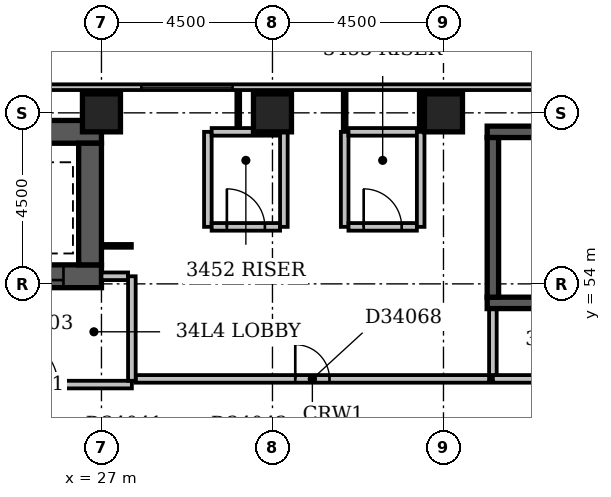
"""IFC4 building model, lengths in metres.
Left out: names, types, materials, properties, quantities, classifications, styles, units other than length and angle.
Written with IfcOpenShell. Run it as: python <this file> out.ifc"""

import sys

from ifc_helpers import new_model, si_unit, direction, frame, frame_2d, origin, origin_2d, place, context, subcontext, project, spatial, rectangle, extrude, element, fill, save


model = new_model("IFC4")
c1 = context("Model", 3, precision=1e-05, world=origin(), true_north=direction((0.0, 1.0)))
c2 = subcontext(c1, "Body", "Model", "MODEL_VIEW")
j1 = project(units=[si_unit("LENGTHUNIT", "METRE"), si_unit("PLANEANGLEUNIT", "RADIAN")], contexts=[c1])
p1 = place(None, origin())
s1 = spatial("IfcSite", under=j1, at=p1, CompositionType="ELEMENT")
p2 = place(p1, origin())
s2 = spatial("IfcBuilding", under=s1, at=p2, CompositionType="ELEMENT")
p3 = place(p2, frame((0.0, 0.0, 137.6)))
s3 = spatial("IfcBuildingStorey", under=s2, at=p3, CompositionType="ELEMENT", Elevation=137.6)
p4 = place(p3, frame((23.9, 54.2, -0.3), z_axis=(0.0, 0.0, 1.0), x_axis=(1.0, 0.0, 0.0)))
e1 = element("IfcWall", 1, at=p4, inside=s3, PredefinedType="SHEAR", context=c2, shape_type="SweptSolid", body=[
    extrude(rectangle(XDim=3.1, YDim=0.6, at=frame_2d((1.55, 0.0))), origin(), (0.0, 0.0, 1.0), 3.6),
])
p5 = place(p4, frame((1.0, 0.0, 0.3)))
e2 = element("IfcOpeningElement", 2, at=p5, cuts=e1, PredefinedType="OPENING", context=c2, shape_type="SweptSolid", body=[
    extrude(rectangle(XDim=1.1, YDim=2.1, at=frame_2d((0.55, 1.05))), frame((0.0, 0.312, 0.0), z_axis=(0.0, -1.0, 0.0), x_axis=(1.0, 0.0, 0.0)), (0.0, 0.0, 1.0), 0.624),
])
p6 = place(p3, frame((23.9, 58.0, -0.3), z_axis=(0.0, 0.0, 1.0), x_axis=(1.0, 0.0, 0.0)))
e3 = element("IfcWall", 3, at=p6, inside=s3, PredefinedType="SHEAR", context=c2, shape_type="SweptSolid", body=[
    extrude(rectangle(XDim=3.1, YDim=0.6, at=frame_2d((1.55, 0.0))), origin(), (0.0, 0.0, 1.0), 3.6),
])
p7 = place(p3, frame((26.7, 54.5, -0.3), z_axis=(0.0, 0.0, 1.0), x_axis=(0.0, 1.0, 0.0)))
e4 = element("IfcWall", 4, at=p7, inside=s3, PredefinedType="SHEAR", context=c2, shape_type="SweptSolid", body=[
    extrude(rectangle(XDim=3.2, YDim=0.6, at=frame_2d((1.6, 0.0))), origin(), (0.0, 0.0, 1.0), 3.6),
])
p8 = place(p3, frame((37.15, 53.5, -0.3), z_axis=(0.0, 0.0, 1.0), x_axis=(1.0, 0.0, 0.0)))
e5 = element("IfcWall", 5, at=p8, inside=s3, PredefinedType="SHEAR", context=c2, shape_type="SweptSolid", body=[
    extrude(rectangle(XDim=7.0, YDim=0.3, at=frame_2d((3.5, 0.0))), origin(), (0.0, 0.0, 1.0), 3.6),
])
p9 = place(p8, frame((5.58, 0.0, 0.3)))
e6 = element("IfcOpeningElement", 6, at=p9, cuts=e5, PredefinedType="OPENING", context=c2, shape_type="SweptSolid", body=[
    extrude(rectangle(XDim=1.1, YDim=2.1, at=frame_2d((0.55, 1.05))), frame((0.0, 0.162, 0.0), z_axis=(0.0, -1.0, 0.0), x_axis=(1.0, 0.0, 0.0)), (0.0, 0.0, 1.0), 0.324),
])
p10 = place(p3, frame((37.15, 58.0, -0.3), z_axis=(0.0, 0.0, 1.0), x_axis=(1.0, 0.0, 0.0)))
e7 = element("IfcWall", 7, at=p10, inside=s3, PredefinedType="SHEAR", context=c2, shape_type="SweptSolid", body=[
    extrude(rectangle(XDim=7.35, YDim=0.3, at=frame_2d((3.675, 0.0))), origin(), (0.0, 0.0, 1.0), 3.6),
])
p11 = place(p3, frame((37.3, 53.65, -0.3), z_axis=(0.0, 0.0, 1.0), x_axis=(0.0, 1.0, 0.0)))
e8 = element("IfcWall", 8, at=p11, inside=s3, PredefinedType="SHEAR", context=c2, shape_type="SweptSolid", body=[
    extrude(rectangle(XDim=4.2, YDim=0.3, at=frame_2d((2.1, 0.0))), origin(), (0.0, 0.0, 1.0), 3.6),
])
for number, where, z_axis, x_axis in (
    (9, (27.0, 58.5, -0.3), (0.0, 0.0, 1.0), (1.0, 0.0, 0.0)),
    (10, (31.5, 58.5, -0.3), (0.0, 0.0, 1.0), (1.0, 0.0, 0.0)),
    (11, (36.0, 58.5, -0.3), (0.0, 0.0, 1.0), (1.0, 0.0, 0.0)),
):
    element("IfcColumn", number, at=place(p3, frame(where, z_axis=z_axis, x_axis=x_axis)), inside=s3, PredefinedType="COLUMN", context=c2, shape_type="SweptSolid", body=[
        extrude(rectangle(XDim=1.0, YDim=1.0, at=origin_2d()), origin(), (0.0, 0.0, 1.0), 3.6),
    ])
p12 = place(p3, frame((68.1, 59.175, 0.0), z_axis=(0.0, 0.0, 1.0), x_axis=(-1.0, 0.0, 0.0)))
e12 = element("IfcWall", 12, at=p12, inside=s3, PredefinedType="STANDARD", context=c2, shape_type="SweptSolid", body=[
    extrude(rectangle(XDim=68.85, YDim=0.15, at=frame_2d((34.425, 0.0))), origin(), (0.0, 0.0, 1.0), 2.7),
])
p13 = place(p12, frame((15.15, 0.0, 0.6)))
e13 = element("IfcOpeningElement", 13, at=p13, cuts=e12, PredefinedType="OPENING", context=c2, shape_type="SweptSolid", body=[
    extrude(rectangle(XDim=2.4, YDim=1.8, at=frame_2d((1.2, 0.9))), frame((0.0, 0.087, 0.0), z_axis=(0.0, -1.0, 0.0), x_axis=(1.0, 0.0, 0.0)), (0.0, 0.0, 1.0), 0.174),
])
p14 = place(p12, frame((19.65, 0.0, 0.6)))
e14 = element("IfcOpeningElement", 14, at=p14, cuts=e12, PredefinedType="OPENING", context=c2, shape_type="SweptSolid", body=[
    extrude(rectangle(XDim=2.4, YDim=1.8, at=frame_2d((1.2, 0.9))), frame((0.0, 0.087, 0.0), z_axis=(0.0, -1.0, 0.0), x_axis=(1.0, 0.0, 0.0)), (0.0, 0.0, 1.0), 0.174),
])
p15 = place(p12, frame((37.65, 0.0, 0.6)))
e15 = element("IfcOpeningElement", 15, at=p15, cuts=e12, PredefinedType="OPENING", context=c2, shape_type="SweptSolid", body=[
    extrude(rectangle(XDim=2.4, YDim=1.8, at=frame_2d((1.2, 0.9))), frame((0.0, 0.087, 0.0), z_axis=(0.0, -1.0, 0.0), x_axis=(1.0, 0.0, 0.0)), (0.0, 0.0, 1.0), 0.174),
])
p16 = place(p3, frame((23.0, 51.35, 0.0), z_axis=(0.0, 0.0, 1.0), x_axis=(1.0, 0.0, 0.0)))
e16 = element("IfcWall", 16, at=p16, inside=s3, PredefinedType="PARTITIONING", context=c2, shape_type="SweptSolid", body=[
    extrude(rectangle(XDim=4.8, YDim=0.2, at=frame_2d((2.4, 0.0))), origin(), (0.0, 0.0, 1.0), 3.3),
])
p17 = place(p16, frame((1.65, 0.0, 0.0)))
e17 = element("IfcOpeningElement", 17, at=p17, cuts=e16, PredefinedType="OPENING", context=c2, shape_type="SweptSolid", body=[
    extrude(rectangle(XDim=1.2, YDim=2.1, at=frame_2d((0.6, 1.05))), frame((0.0, 0.112, 0.0), z_axis=(0.0, -1.0, 0.0), x_axis=(1.0, 0.0, 0.0)), (0.0, 0.0, 1.0), 0.224),
])
p18 = place(p3, frame((27.8, 51.45, 0.0), z_axis=(0.0, 0.0, 1.0), x_axis=(0.0, 1.0, 0.0)))
e18 = element("IfcWall", 18, at=p18, inside=s3, PredefinedType="PARTITIONING", context=c2, shape_type="SweptSolid", body=[
    extrude(rectangle(XDim=2.75, YDim=0.2, at=frame_2d((1.375, 0.0))), origin(), (0.0, 0.0, 1.0), 3.3),
])
p19 = place(p3, frame((27.0, 54.2, 0.0), z_axis=(0.0, 0.0, 1.0), x_axis=(1.0, 0.0, 0.0)))
e19 = element("IfcWall", 19, at=p19, inside=s3, PredefinedType="PARTITIONING", context=c2, shape_type="SweptSolid", body=[
    extrude(rectangle(XDim=0.7, YDim=0.2, at=frame_2d((0.35, 0.0))), origin(), (0.0, 0.0, 1.0), 3.3),
])
p20 = place(p3, frame((37.3, 51.5, 0.0), z_axis=(0.0, 0.0, 1.0), x_axis=(1.0, 0.0, 0.0)))
e20 = element("IfcWall", 20, at=p20, inside=s3, PredefinedType="PARTITIONING", context=c2, shape_type="SweptSolid", body=[
    extrude(rectangle(XDim=6.7, YDim=0.2, at=frame_2d((3.35, 0.0))), origin(), (0.0, 0.0, 1.0), 3.3),
])
p21 = place(p20, frame((2.75, 0.0, 0.0)))
e21 = element("IfcOpeningElement", 21, at=p21, cuts=e20, PredefinedType="OPENING", context=c2, shape_type="SweptSolid", body=[
    extrude(rectangle(XDim=1.2, YDim=2.1, at=frame_2d((0.6, 1.05))), frame((0.0, 0.112, 0.0), z_axis=(0.0, -1.0, 0.0), x_axis=(1.0, 0.0, 0.0)), (0.0, 0.0, 1.0), 0.224),
])
p22 = place(p3, frame((37.3, 51.6, 0.0), z_axis=(0.0, 0.0, 1.0), x_axis=(0.0, 1.0, 0.0)))
e22 = element("IfcWall", 22, at=p22, inside=s3, PredefinedType="PARTITIONING", context=c2, shape_type="SweptSolid", body=[
    extrude(rectangle(XDim=1.73, YDim=0.2, at=frame_2d((0.865, 0.0))), origin(), (0.0, 0.0, 1.0), 3.3),
])
p23 = place(p3, frame((27.9, 51.5, 0.0), z_axis=(0.0, 0.0, 1.0), x_axis=(1.0, 0.0, 0.0)))
e23 = element("IfcWall", 23, at=p23, inside=s3, PredefinedType="PARTITIONING", context=c2, shape_type="SweptSolid", body=[
    extrude(rectangle(XDim=9.3, YDim=0.2, at=frame_2d((4.65, 0.0))), origin(), (0.0, 0.0, 1.0), 3.3),
])
p24 = place(p23, frame((4.2, 0.0, 0.0)))
e24 = element("IfcOpeningElement", 24, at=p24, cuts=e23, PredefinedType="OPENING", context=c2, shape_type="SweptSolid", body=[
    extrude(rectangle(XDim=0.9, YDim=2.1, at=frame_2d((0.45, 1.05))), frame((0.0, 0.112, 0.0), z_axis=(0.0, -1.0, 0.0), x_axis=(1.0, 0.0, 0.0)), (0.0, 0.0, 1.0), 0.224),
])
p25 = place(p3, frame((27.0, 55.0, 0.0), z_axis=(0.0, 0.0, 1.0), x_axis=(1.0, 0.0, 0.0)))
e25 = element("IfcWall", 25, at=p25, inside=s3, PredefinedType="PARTITIONING", context=c2, shape_type="SweptSolid", body=[
    extrude(rectangle(XDim=0.8, YDim=0.1, at=frame_2d((0.4, 0.0))), origin(), (0.0, 0.0, 1.0), 3.3),
])
p26 = place(p3, frame((29.8, 55.5, 0.0), z_axis=(0.0, 0.0, 1.0), x_axis=(0.0, 1.0, 0.0)))
e26 = element("IfcWall", 26, at=p26, inside=s3, PredefinedType="PARTITIONING", context=c2, shape_type="SweptSolid", body=[
    extrude(rectangle(XDim=2.5, YDim=0.2, at=frame_2d((1.25, 0.0))), origin(), (0.0, 0.0, 1.0), 3.3),
])
p27 = place(p3, frame((29.9, 55.5, 0.0), z_axis=(0.0, 0.0, 1.0), x_axis=(1.0, 0.0, 0.0)))
e27 = element("IfcWall", 27, at=p27, inside=s3, PredefinedType="PARTITIONING", context=c2, shape_type="SweptSolid", body=[
    extrude(rectangle(XDim=1.8, YDim=0.2, at=frame_2d((0.9, 0.0))), origin(), (0.0, 0.0, 1.0), 3.3),
])
p28 = place(p27, frame((0.4, 0.0, 0.0)))
e28 = element("IfcOpeningElement", 28, at=p28, cuts=e27, PredefinedType="OPENING", context=c2, shape_type="SweptSolid", body=[
    extrude(rectangle(XDim=1.0, YDim=2.1, at=frame_2d((0.5, 1.05))), frame((0.0, 0.112, 0.0), z_axis=(0.0, -1.0, 0.0), x_axis=(1.0, 0.0, 0.0)), (0.0, 0.0, 1.0), 0.224),
])
for number, where, z_axis, x_axis in (
    (29, (31.8, 55.5, 0.0), (0.0, 0.0, 1.0), (0.0, 1.0, 0.0)),
    (30, (33.4, 55.5, 0.0), (0.0, 0.0, 1.0), (0.0, 1.0, 0.0)),
):
    element("IfcWall", number, at=place(p3, frame(where, z_axis=z_axis, x_axis=x_axis)), inside=s3, PredefinedType="PARTITIONING", context=c2, shape_type="SweptSolid", body=[
        extrude(rectangle(XDim=2.5, YDim=0.2, at=frame_2d((1.25, 0.0))), origin(), (0.0, 0.0, 1.0), 3.3),
    ])
p29 = place(p3, frame((33.5, 55.5, 0.0), z_axis=(0.0, 0.0, 1.0), x_axis=(1.0, 0.0, 0.0)))
e31 = element("IfcWall", 31, at=p29, inside=s3, PredefinedType="PARTITIONING", context=c2, shape_type="SweptSolid", body=[
    extrude(rectangle(XDim=1.8, YDim=0.2, at=frame_2d((0.9, 0.0))), origin(), (0.0, 0.0, 1.0), 3.3),
])
p30 = place(p29, frame((0.4, 0.0, 0.0)))
e32 = element("IfcOpeningElement", 32, at=p30, cuts=e31, PredefinedType="OPENING", context=c2, shape_type="SweptSolid", body=[
    extrude(rectangle(XDim=1.0, YDim=2.1, at=frame_2d((0.5, 1.05))), frame((0.0, 0.112, 0.0), z_axis=(0.0, -1.0, 0.0), x_axis=(1.0, 0.0, 0.0)), (0.0, 0.0, 1.0), 0.224),
])
p31 = place(p3, frame((35.4, 55.5, 0.0), z_axis=(0.0, 0.0, 1.0), x_axis=(0.0, 1.0, 0.0)))
e33 = element("IfcWall", 33, at=p31, inside=s3, PredefinedType="PARTITIONING", context=c2, shape_type="SweptSolid", body=[
    extrude(rectangle(XDim=2.5, YDim=0.2, at=frame_2d((1.25, 0.0))), origin(), (0.0, 0.0, 1.0), 2.4),
])
p32 = place(p3, frame((29.9, 58.0, 0.0), z_axis=(0.0, 0.0, 1.0), x_axis=(1.0, 0.0, 0.0)))
e34 = element("IfcWall", 34, at=p32, inside=s3, PredefinedType="PARTITIONING", context=c2, shape_type="SweptSolid", body=[
    extrude(rectangle(XDim=1.8, YDim=0.2, at=frame_2d((0.9, 0.0))), origin(), (0.0, 0.0, 1.0), 3.3),
])
p33 = place(p3, frame((33.4, 58.0, 0.0), z_axis=(0.0, 0.0, 1.0), x_axis=(0.0, 1.0, 0.0)))
e35 = element("IfcWall", 35, at=p33, inside=s3, PredefinedType="PARTITIONING", context=c2, shape_type="SweptSolid", body=[
    extrude(rectangle(XDim=1.1, YDim=0.1, at=frame_2d((0.55, 0.0))), origin(), (0.0, 0.0, 1.0), 3.3),
])
p34 = place(p3, frame((33.5, 58.0, 0.0), z_axis=(0.0, 0.0, 1.0), x_axis=(1.0, 0.0, 0.0)))
e36 = element("IfcWall", 36, at=p34, inside=s3, PredefinedType="PARTITIONING", context=c2, shape_type="SweptSolid", body=[
    extrude(rectangle(XDim=1.8, YDim=0.2, at=frame_2d((0.9, 0.0))), origin(), (0.0, 0.0, 1.0), 3.3),
])
p35 = place(p3, frame((35.4, 58.0, 0.0), z_axis=(0.0, 0.0, 1.0), x_axis=(0.0, 1.0, 0.0)))
e37 = element("IfcWall", 37, at=p35, inside=s3, PredefinedType="PARTITIONING", context=c2, shape_type="SweptSolid", body=[
    extrude(rectangle(XDim=1.1, YDim=0.1, at=frame_2d((0.55, 0.0))), origin(), (0.0, 0.0, 1.0), 2.4),
])
p36 = place(p3, frame((30.6, 58.1, 0.0), z_axis=(0.0, 0.0, 1.0), x_axis=(0.0, 1.0, 0.0)))
e38 = element("IfcWall", 38, at=p36, inside=s3, PredefinedType="PARTITIONING", context=c2, shape_type="SweptSolid", body=[
    extrude(rectangle(XDim=1.0, YDim=0.1, at=frame_2d((0.5, 0.0))), origin(), (0.0, 0.0, 1.0), 3.3),
])
p37 = place(p15, origin())
e39 = element("IfcWindow", 39, at=p37, inside=s3, PartitioningType="SINGLE_PANEL", PredefinedType="WINDOW", context=c2, shape_type="SweptSolid", body=[
    extrude(rectangle(XDim=2.4, YDim=1.8, at=frame_2d((1.2, 0.9))), frame((0.0, 0.03, 0.0), z_axis=(0.0, -1.0, 0.0), x_axis=(1.0, 0.0, 0.0)), (0.0, 0.0, 1.0), 0.06),
])
fill(e15, e39)
p38 = place(p17, origin())
e40 = element("IfcDoor", 40, at=p38, inside=s3, OperationType="SINGLE_SWING_LEFT", PredefinedType="DOOR", context=c2, shape_type="SweptSolid", body=[
    extrude(rectangle(XDim=1.2, YDim=2.1, at=frame_2d((0.6, 1.05))), frame((0.0, 0.025, 0.0), z_axis=(0.0, -1.0, 0.0), x_axis=(1.0, 0.0, 0.0)), (0.0, 0.0, 1.0), 0.05),
])
fill(e17, e40)
p39 = place(p5, origin())
e41 = element("IfcDoor", 41, at=p39, inside=s3, OperationType="SLIDING_TO_LEFT", PredefinedType="DOOR", context=c2, shape_type="SweptSolid", body=[
    extrude(rectangle(XDim=1.1, YDim=2.1, at=frame_2d((0.55, 1.05))), frame((0.0, 0.025, 0.0), z_axis=(0.0, -1.0, 0.0), x_axis=(1.0, 0.0, 0.0)), (0.0, 0.0, 1.0), 0.05),
])
fill(e2, e41)
p40 = place(p24, origin())
e42 = element("IfcDoor", 42, at=p40, inside=s3, OperationType="SINGLE_SWING_LEFT", PredefinedType="DOOR", context=c2, shape_type="SweptSolid", body=[
    extrude(rectangle(XDim=0.9, YDim=2.1, at=frame_2d((0.45, 1.05))), frame((0.0, 0.025, 0.0), z_axis=(0.0, -1.0, 0.0), x_axis=(1.0, 0.0, 0.0)), (0.0, 0.0, 1.0), 0.05),
])
fill(e24, e42)
p41 = place(p28, origin())
e43 = element("IfcDoor", 43, at=p41, inside=s3, OperationType="SINGLE_SWING_LEFT", PredefinedType="DOOR", context=c2, shape_type="SweptSolid", body=[
    extrude(rectangle(XDim=1.0, YDim=2.1, at=frame_2d((0.5, 1.05))), frame((0.0, 0.025, 0.0), z_axis=(0.0, -1.0, 0.0), x_axis=(1.0, 0.0, 0.0)), (0.0, 0.0, 1.0), 0.05),
])
fill(e28, e43)
p42 = place(p30, origin())
e44 = element("IfcDoor", 44, at=p42, inside=s3, OperationType="SINGLE_SWING_LEFT", PredefinedType="DOOR", context=c2, shape_type="SweptSolid", body=[
    extrude(rectangle(XDim=1.0, YDim=2.1, at=frame_2d((0.5, 1.05))), frame((0.0, 0.025, 0.0), z_axis=(0.0, -1.0, 0.0), x_axis=(1.0, 0.0, 0.0)), (0.0, 0.0, 1.0), 0.05),
])
fill(e32, e44)
save(model, sys.argv[1])
